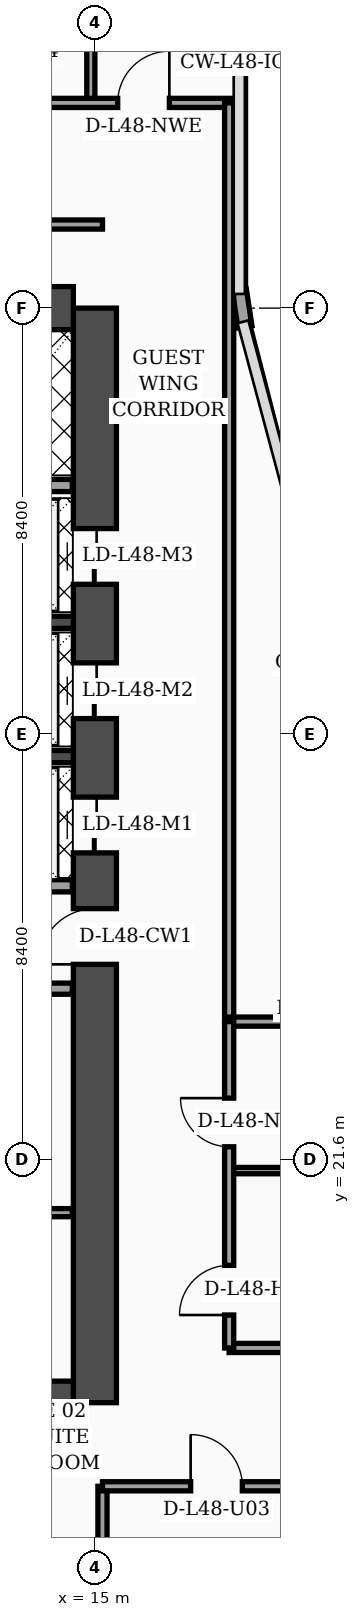
"""IFC4 building model, lengths in metres.
Left out: names, types, materials, properties, quantities, classifications, styles, units other than length and angle.
Written with IfcOpenShell. Run it as: python <this file> out.ifc"""

import sys

from ifc_helpers import new_model, si_unit, direction, frame, frame_2d, origin, place, context, subcontext, project, spatial, rectangle, extrude, element, fill, save


model = new_model("IFC4")
c1 = context("Model", 3, precision=1e-05, world=origin(), true_north=direction((0.0, 1.0)))
c2 = subcontext(c1, "Body", "Model", "MODEL_VIEW")
j1 = project(units=[si_unit("LENGTHUNIT", "METRE"), si_unit("PLANEANGLEUNIT", "RADIAN")], contexts=[c1])
p1 = place(None, origin())
s1 = spatial("IfcSite", under=j1, at=p1, CompositionType="ELEMENT")
p2 = place(p1, origin())
s2 = spatial("IfcBuilding", under=s1, at=p2, CompositionType="ELEMENT")
p3 = place(p2, frame((0.0, 0.0, 195.1)))
s3 = spatial("IfcBuildingStorey", under=s2, at=p3, CompositionType="ELEMENT", Elevation=195.1)
p4 = place(p3, frame((15.0, 16.8, 0.0), z_axis=(0.0, 0.0, 1.0), x_axis=(0.0, 1.0, 0.0)))
e1 = element("IfcWall", 1, at=p4, inside=s3, PredefinedType="SHEAR", context=c2, shape_type="SweptSolid", body=[
    extrude(rectangle(XDim=21.6, YDim=0.85, at=frame_2d((10.8, 0.0))), origin(), (0.0, 0.0, 1.0), 4.05),
])
p5 = place(p4, frame((8.65, 0.0, 0.0)))
e2 = element("IfcOpeningElement", 2, at=p5, cuts=e1, PredefinedType="OPENING", context=c2, shape_type="SweptSolid", body=[
    extrude(rectangle(XDim=1.1, YDim=2.2, at=frame_2d((0.55, 1.1))), frame((0.0, 0.435, 0.0), z_axis=(0.0, -1.0, 0.0), x_axis=(1.0, 0.0, 0.0)), (0.0, 0.0, 1.0), 0.87),
])
p6 = place(p4, frame((10.85, 0.0, 0.0)))
e3 = element("IfcOpeningElement", 3, at=p6, cuts=e1, PredefinedType="OPENING", context=c2, shape_type="SweptSolid", body=[
    extrude(rectangle(XDim=1.1, YDim=2.2, at=frame_2d((0.55, 1.1))), frame((0.0, 0.435, 0.0), z_axis=(0.0, -1.0, 0.0), x_axis=(1.0, 0.0, 0.0)), (0.0, 0.0, 1.0), 0.87),
])
p7 = place(p4, frame((13.5, 0.0, 0.0)))
e4 = element("IfcOpeningElement", 4, at=p7, cuts=e1, PredefinedType="OPENING", context=c2, shape_type="SweptSolid", body=[
    extrude(rectangle(XDim=1.1, YDim=2.2, at=frame_2d((0.55, 1.1))), frame((0.0, 0.435, 0.0), z_axis=(0.0, -1.0, 0.0), x_axis=(1.0, 0.0, 0.0)), (0.0, 0.0, 1.0), 0.87),
])
p8 = place(p4, frame((16.15, 0.0, 0.0)))
e5 = element("IfcOpeningElement", 5, at=p8, cuts=e1, PredefinedType="OPENING", context=c2, shape_type="SweptSolid", body=[
    extrude(rectangle(XDim=1.1, YDim=2.2, at=frame_2d((0.55, 1.1))), frame((0.0, 0.435, 0.0), z_axis=(0.0, -1.0, 0.0), x_axis=(1.0, 0.0, 0.0)), (0.0, 0.0, 1.0), 0.87),
])
for number, where, z_axis, x_axis in (
    (6, (4.625, 38.4, 0.0), (0.0, 0.0, 1.0), (1.0, 0.0, 0.0)),
    (7, (4.625, 16.8, 0.0), (0.0, 0.0, 1.0), (1.0, 0.0, 0.0)),
):
    element("IfcWall", number, at=place(p3, frame(where, z_axis=z_axis, x_axis=x_axis)), inside=s3, PredefinedType="SHEAR", context=c2, shape_type="SweptSolid", body=[
        extrude(rectangle(XDim=9.95, YDim=0.85, at=frame_2d((4.975, 0.0))), origin(), (0.0, 0.0, 1.0), 4.05),
    ])
for number, where, z_axis, x_axis in (
    (8, (12.18, 29.55, 0.0), (0.0, 0.0, 1.0), (1.0, 0.0, 0.0)),
    (9, (12.18, 32.2, 0.0), (0.0, 0.0, 1.0), (1.0, 0.0, 0.0)),
):
    element("IfcWall", number, at=place(p3, frame(where, z_axis=z_axis, x_axis=x_axis)), inside=s3, PredefinedType="SOLIDWALL", context=c2, shape_type="SweptSolid", body=[
        extrude(rectangle(XDim=2.395, YDim=0.24, at=frame_2d((1.198, 0.0))), origin(), (0.0, 0.0, 1.0), 4.05),
    ])
p9 = place(p3, frame((17.962, 38.03, 0.0), z_axis=(0.0, 0.0, 1.0), x_axis=(-0.15141125477, 0.988470855377, 0.0)))
e10 = element("IfcWall", 10, at=p9, inside=s3, PredefinedType="SOLIDWALL", context=c2, shape_type="SweptSolid", body=[
    extrude(rectangle(XDim=0.739, YDim=0.28, at=frame_2d((0.369, 0.0))), origin(), (0.0, 0.0, 1.0), 4.05),
])
p10 = place(p3, frame((9.68, 20.55, 0.0), z_axis=(0.0, 0.0, 1.0), x_axis=(1.0, 0.0, 0.0)))
e11 = element("IfcWall", 11, at=p10, inside=s3, PredefinedType="PARTITIONING", context=c2, shape_type="SweptSolid", body=[
    extrude(rectangle(XDim=4.875, YDim=0.16, at=frame_2d((2.438, 0.0))), origin(), (0.0, 0.0, 1.0), 4.05),
])
p11 = place(p10, frame((1.1, 0.0, 0.0)))
e12 = element("IfcOpeningElement", 12, at=p11, cuts=e11, PredefinedType="OPENING", context=c2, shape_type="SweptSolid", body=[
    extrude(rectangle(XDim=0.98, YDim=2.15, at=frame_2d((0.49, 1.075))), frame((0.0, 0.09, 0.0), z_axis=(0.0, -1.0, 0.0), x_axis=(1.0, 0.0, 0.0)), (0.0, 0.0, 1.0), 0.18),
])
p12 = place(p3, frame((9.68, 24.97, 0.0), z_axis=(0.0, 0.0, 1.0), x_axis=(1.0, 0.0, 0.0)))
e13 = element("IfcWall", 13, at=p12, inside=s3, PredefinedType="SOLIDWALL", context=c2, shape_type="SweptSolid", body=[
    extrude(rectangle(XDim=4.875, YDim=0.22, at=frame_2d((2.438, 0.0))), origin(), (0.0, 0.0, 1.0), 3.45),
])
p13 = place(p12, frame((0.9, 0.0, 0.0)))
e14 = element("IfcOpeningElement", 14, at=p13, cuts=e13, PredefinedType="OPENING", context=c2, shape_type="SweptSolid", body=[
    extrude(rectangle(XDim=0.98, YDim=2.15, at=frame_2d((0.49, 1.075))), frame((0.0, 0.12, 0.0), z_axis=(0.0, -1.0, 0.0), x_axis=(1.0, 0.0, 0.0)), (0.0, 0.0, 1.0), 0.24),
])
p14 = place(p3, frame((12.25, 27.0, 0.0), z_axis=(0.0, 0.0, 1.0), x_axis=(1.0, 0.0, 0.0)))
e15 = element("IfcWall", 15, at=p14, inside=s3, PredefinedType="SOLIDWALL", context=c2, shape_type="SweptSolid", body=[
    extrude(rectangle(XDim=2.305, YDim=0.24, at=frame_2d((1.152, 0.0))), origin(), (0.0, 0.0, 1.0), 4.05),
])
p15 = place(p3, frame((9.66, 34.9, 0.0), z_axis=(0.0, 0.0, 1.0), x_axis=(1.0, 0.0, 0.0)))
e16 = element("IfcWall", 16, at=p15, inside=s3, PredefinedType="SOLIDWALL", context=c2, shape_type="SweptSolid", body=[
    extrude(rectangle(XDim=4.895, YDim=0.24, at=frame_2d((2.448, 0.0))), origin(), (0.0, 0.0, 1.0), 4.05),
])
p16 = place(p3, frame((15.15, 2.44, 0.0), z_axis=(0.0, 0.0, 1.0), x_axis=(0.0, 1.0, 0.0)))
e17 = element("IfcWall", 17, at=p16, inside=s3, PredefinedType="PARTITIONING", context=c2, shape_type="SweptSolid", body=[
    extrude(rectangle(XDim=12.71, YDim=0.18, at=frame_2d((6.355, 0.0))), origin(), (0.0, 0.0, 1.0), 2.35),
])
p17 = place(p3, frame((15.15, 15.15, 0.0), z_axis=(0.0, 0.0, 1.0), x_axis=(1.0, 0.0, 0.0)))
e18 = element("IfcWall", 18, at=p17, inside=s3, PredefinedType="PARTITIONING", context=c2, shape_type="SweptSolid", body=[
    extrude(rectangle(XDim=6.45, YDim=0.18, at=frame_2d((3.225, 0.0))), origin(), (0.0, 0.0, 1.0), 2.35),
])
p18 = place(p17, frame((1.74, 0.0, 0.0)))
e19 = element("IfcOpeningElement", 19, at=p18, cuts=e18, PredefinedType="OPENING", context=c2, shape_type="SweptSolid", body=[
    extrude(rectangle(XDim=1.02, YDim=2.2, at=frame_2d((0.51, 1.1))), frame((0.0, 0.1, 0.0), z_axis=(0.0, -1.0, 0.0), x_axis=(1.0, 0.0, 0.0)), (0.0, 0.0, 1.0), 0.2),
])
p19 = place(p3, frame((14.92, 42.45, 0.0), z_axis=(0.0, 0.0, 1.0), x_axis=(0.0, 1.0, 0.0)))
e20 = element("IfcWall", 20, at=p19, inside=s3, PredefinedType="PARTITIONING", context=c2, shape_type="SweptSolid", body=[
    extrude(rectangle(XDim=5.35, YDim=0.16, at=frame_2d((2.675, 0.0))), origin(), (0.0, 0.0, 1.0), 3.6),
])
p20 = place(p3, frame((0.08, 42.45, 0.0), z_axis=(0.0, 0.0, 1.0), x_axis=(1.0, 0.0, 0.0)))
e21 = element("IfcWall", 21, at=p20, inside=s3, PredefinedType="PARTITIONING", context=c2, shape_type="SweptSolid", body=[
    extrude(rectangle(XDim=17.77, YDim=0.18, at=frame_2d((8.885, 0.0))), origin(), (0.0, 0.0, 1.0), 3.45),
])
p21 = place(p20, frame((0.9, 0.0, 0.0)))
e22 = element("IfcOpeningElement", 22, at=p21, cuts=e21, PredefinedType="OPENING", context=c2, shape_type="SweptSolid", body=[
    extrude(rectangle(XDim=1.02, YDim=2.2, at=frame_2d((0.51, 1.1))), frame((0.0, 0.1, 0.0), z_axis=(0.0, -1.0, 0.0), x_axis=(1.0, 0.0, 0.0)), (0.0, 0.0, 1.0), 0.2),
])
p22 = place(p20, frame((7.38, 0.0, 0.0)))
e23 = element("IfcOpeningElement", 23, at=p22, cuts=e21, PredefinedType="OPENING", context=c2, shape_type="SweptSolid", body=[
    extrude(rectangle(XDim=1.02, YDim=2.2, at=frame_2d((0.51, 1.1))), frame((0.0, 0.1, 0.0), z_axis=(0.0, -1.0, 0.0), x_axis=(1.0, 0.0, 0.0)), (0.0, 0.0, 1.0), 0.2),
])
p23 = place(p20, frame((15.37, 0.0, 0.0)))
e24 = element("IfcOpeningElement", 24, at=p23, cuts=e21, PredefinedType="OPENING", context=c2, shape_type="SweptSolid", body=[
    extrude(rectangle(XDim=1.02, YDim=2.2, at=frame_2d((0.51, 1.1))), frame((0.0, 0.1, 0.0), z_axis=(0.0, -1.0, 0.0), x_axis=(1.0, 0.0, 0.0)), (0.0, 0.0, 1.0), 0.2),
])
p24 = place(p3, frame((17.65, 24.3, 0.0), z_axis=(0.0, 0.0, 1.0), x_axis=(0.0, 1.0, 0.0)))
e25 = element("IfcWall", 25, at=p24, inside=s3, PredefinedType="PARTITIONING", context=c2, shape_type="SweptSolid", body=[
    extrude(rectangle(XDim=18.15, YDim=0.18, at=frame_2d((9.075, 0.0))), origin(), (0.0, 0.0, 1.0), 3.45),
])
p25 = place(p3, frame((3.755, 40.05, 0.0), z_axis=(0.0, 0.0, 1.0), x_axis=(1.0, 0.0, 0.0)))
e26 = element("IfcWall", 26, at=p25, inside=s3, PredefinedType="PARTITIONING", context=c2, shape_type="SweptSolid", body=[
    extrude(rectangle(XDim=11.395, YDim=0.18, at=frame_2d((5.698, 0.0))), origin(), (0.0, 0.0, 1.0), 3.45),
])
p26 = place(p3, frame((17.65, 17.88, 0.0), z_axis=(0.0, 0.0, 1.0), x_axis=(1.0, 0.0, 0.0)))
e27 = element("IfcWall", 27, at=p26, inside=s3, PredefinedType="PARTITIONING", context=c2, shape_type="SweptSolid", body=[
    extrude(rectangle(XDim=3.9, YDim=0.18, at=frame_2d((1.95, 0.0))), origin(), (0.0, 0.0, 1.0), 4.05),
])
p27 = place(p3, frame((17.65, 21.38, 0.0), z_axis=(0.0, 0.0, 1.0), x_axis=(1.0, 0.0, 0.0)))
e28 = element("IfcWall", 28, at=p27, inside=s3, PredefinedType="PARTITIONING", context=c2, shape_type="SweptSolid", body=[
    extrude(rectangle(XDim=3.9, YDim=0.125, at=frame_2d((1.95, 0.0))), origin(), (0.0, 0.0, 1.0), 4.05),
])
p28 = place(p3, frame((17.65, 24.32, 0.0), z_axis=(0.0, 0.0, 1.0), x_axis=(1.0, 0.0, 0.0)))
e29 = element("IfcWall", 29, at=p28, inside=s3, PredefinedType="PARTITIONING", context=c2, shape_type="SweptSolid", body=[
    extrude(rectangle(XDim=3.95, YDim=0.18, at=frame_2d((1.975, 0.0))), origin(), (0.0, 0.0, 1.0), 4.05),
])
p29 = place(p3, frame((17.65, 17.88, 0.0), z_axis=(0.0, 0.0, 1.0), x_axis=(0.0, 1.0, 0.0)))
e30 = element("IfcWall", 30, at=p29, inside=s3, PredefinedType="PARTITIONING", context=c2, shape_type="SweptSolid", body=[
    extrude(rectangle(XDim=6.44, YDim=0.18, at=frame_2d((3.22, 0.0))), origin(), (0.0, 0.0, 1.0), 4.05),
])
p30 = place(p29, frame((0.65, 0.0, 0.0)))
e31 = element("IfcOpeningElement", 31, at=p30, cuts=e30, PredefinedType="OPENING", context=c2, shape_type="SweptSolid", body=[
    extrude(rectangle(XDim=0.98, YDim=2.15, at=frame_2d((0.49, 1.075))), frame((0.0, 0.1, 0.0), z_axis=(0.0, -1.0, 0.0), x_axis=(1.0, 0.0, 0.0)), (0.0, 0.0, 1.0), 0.2),
])
p31 = place(p29, frame((3.97, 0.0, 0.0)))
e32 = element("IfcOpeningElement", 32, at=p31, cuts=e30, PredefinedType="OPENING", context=c2, shape_type="SweptSolid", body=[
    extrude(rectangle(XDim=0.96, YDim=2.2, at=frame_2d((0.48, 1.1))), frame((0.0, 0.1, 0.0), z_axis=(0.0, -1.0, 0.0), x_axis=(1.0, 0.0, 0.0)), (0.0, 0.0, 1.0), 0.2),
])
p32 = place(p18, origin())
e33 = element("IfcDoor", 33, at=p32, inside=s3, OperationType="SINGLE_SWING_LEFT", PredefinedType="DOOR", context=c2, shape_type="SweptSolid", body=[
    extrude(rectangle(XDim=1.02, YDim=2.2, at=frame_2d((0.51, 1.1))), frame((0.0, 0.025, 0.0), z_axis=(0.0, -1.0, 0.0), x_axis=(1.0, 0.0, 0.0)), (0.0, 0.0, 1.0), 0.05),
])
fill(e19, e33)
p33 = place(p23, origin())
e34 = element("IfcDoor", 34, at=p33, inside=s3, OperationType="SINGLE_SWING_RIGHT", PredefinedType="DOOR", context=c2, shape_type="SweptSolid", body=[
    extrude(rectangle(XDim=1.02, YDim=2.2, at=frame_2d((0.51, 1.1))), frame((0.0, 0.025, 0.0), z_axis=(0.0, -1.0, 0.0), x_axis=(1.0, 0.0, 0.0)), (0.0, 0.0, 1.0), 0.05),
])
fill(e24, e34)
p34 = place(p30, origin())
e35 = element("IfcDoor", 35, at=p34, inside=s3, OperationType="SINGLE_SWING_LEFT", PredefinedType="DOOR", context=c2, shape_type="SweptSolid", body=[
    extrude(rectangle(XDim=0.98, YDim=2.15, at=frame_2d((0.49, 1.075))), frame((0.0, 0.025, 0.0), z_axis=(0.0, -1.0, 0.0), x_axis=(1.0, 0.0, 0.0)), (0.0, 0.0, 1.0), 0.05),
])
fill(e31, e35)
p35 = place(p31, origin())
e36 = element("IfcDoor", 36, at=p35, inside=s3, OperationType="SINGLE_SWING_RIGHT", PredefinedType="DOOR", context=c2, shape_type="SweptSolid", body=[
    extrude(rectangle(XDim=0.96, YDim=2.2, at=frame_2d((0.48, 1.1))), frame((0.0, 0.025, 0.0), z_axis=(0.0, -1.0, 0.0), x_axis=(1.0, 0.0, 0.0)), (0.0, 0.0, 1.0), 0.05),
])
fill(e32, e36)
p36 = place(p5, origin())
e37 = element("IfcDoor", 37, at=p36, inside=s3, OperationType="SINGLE_SWING_LEFT", PredefinedType="DOOR", context=c2, shape_type="SweptSolid", body=[
    extrude(rectangle(XDim=1.1, YDim=2.2, at=frame_2d((0.55, 1.1))), frame((0.0, 0.025, 0.0), z_axis=(0.0, -1.0, 0.0), x_axis=(1.0, 0.0, 0.0)), (0.0, 0.0, 1.0), 0.05),
])
fill(e2, e37)
p37 = place(p6, origin())
e38 = element("IfcDoor", 38, at=p37, inside=s3, OperationType="DOUBLE_DOOR_SLIDING", PredefinedType="DOOR", context=c2, shape_type="SweptSolid", body=[
    extrude(rectangle(XDim=1.1, YDim=2.2, at=frame_2d((0.55, 1.1))), frame((0.0, 0.025, 0.0), z_axis=(0.0, -1.0, 0.0), x_axis=(1.0, 0.0, 0.0)), (0.0, 0.0, 1.0), 0.05),
])
fill(e3, e38)
p38 = place(p7, origin())
e39 = element("IfcDoor", 39, at=p38, inside=s3, OperationType="DOUBLE_DOOR_SLIDING", PredefinedType="DOOR", context=c2, shape_type="SweptSolid", body=[
    extrude(rectangle(XDim=1.1, YDim=2.2, at=frame_2d((0.55, 1.1))), frame((0.0, 0.025, 0.0), z_axis=(0.0, -1.0, 0.0), x_axis=(1.0, 0.0, 0.0)), (0.0, 0.0, 1.0), 0.05),
])
fill(e4, e39)
p39 = place(p8, origin())
e40 = element("IfcDoor", 40, at=p39, inside=s3, OperationType="DOUBLE_DOOR_SLIDING", PredefinedType="DOOR", context=c2, shape_type="SweptSolid", body=[
    extrude(rectangle(XDim=1.1, YDim=2.2, at=frame_2d((0.55, 1.1))), frame((0.0, 0.025, 0.0), z_axis=(0.0, -1.0, 0.0), x_axis=(1.0, 0.0, 0.0)), (0.0, 0.0, 1.0), 0.05),
])
fill(e5, e40)
save(model, sys.argv[1])
